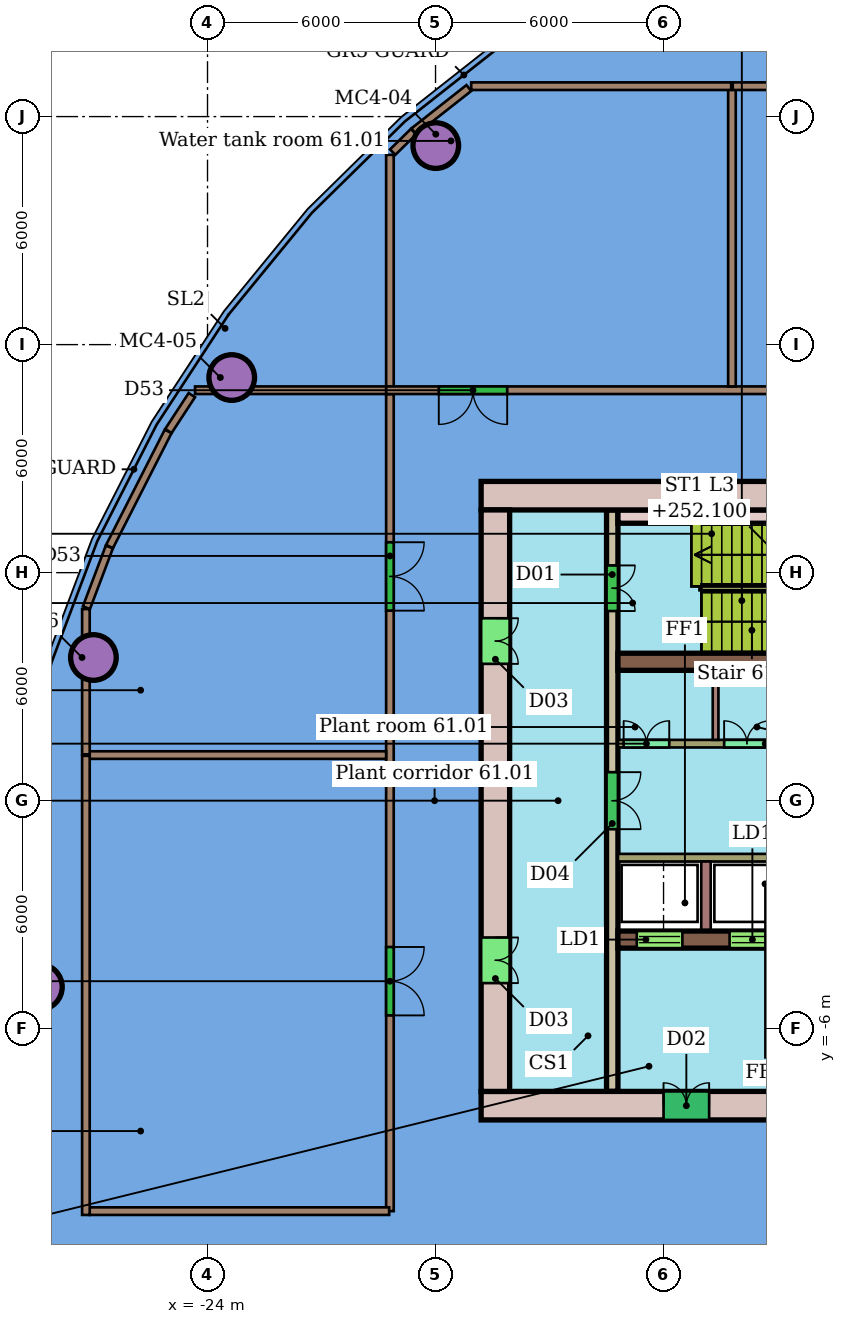
"""IFC4 building model, lengths in metres.
Left out: names, types, materials, properties, quantities, classifications, styles, units other than length and angle.
Written with IfcOpenShell. Run it as: python <this file> out.ifc"""

import sys

from ifc_helpers import new_model, si_unit, direction, frame, frame_2d, origin, origin_2d, place, context, subcontext, project, spatial, rectangle, hollow_circle, extrude, element, fill, save


model = new_model("IFC4")
c1 = context("Model", 3, precision=1e-05, world=origin(), true_north=direction((0.0, 1.0)))
c2 = subcontext(c1, "Body", "Model", "MODEL_VIEW")
j1 = project(units=[si_unit("LENGTHUNIT", "METRE"), si_unit("PLANEANGLEUNIT", "RADIAN")], contexts=[c1])
p1 = place(None, origin())
s1 = spatial("IfcSite", under=j1, at=p1, CompositionType="ELEMENT")
p2 = place(p1, origin())
s2 = spatial("IfcBuilding", under=s1, at=p2, CompositionType="ELEMENT")
p3 = place(p2, frame((0.0, 0.0, 246.1)))
s3 = spatial("IfcBuildingStorey", under=s2, at=p3, CompositionType="ELEMENT", Elevation=246.1)
for number, where, z_axis, x_axis in (
    (1, (-17.993, 17.237, 0.0), (0.0, 0.0, 1.0), (1.0, 0.0, 0.0)),
    (2, (-23.363, 11.134, 0.0), (0.0, 0.0, 1.0), (1.0, 0.0, 0.0)),
    (3, (-27.003, 3.768, 0.0), (0.0, 0.0, 1.0), (1.0, 0.0, 0.0)),
    (4, (-28.424, -4.901, 0.0), (0.0, 0.0, 1.0), (1.0, 0.0, 0.0)),
):
    element("IfcColumn", number, at=place(p3, frame(where, z_axis=z_axis, x_axis=x_axis)), inside=s3, PredefinedType="COLUMN", context=c2, shape_type="SweptSolid", body=[
        extrude(hollow_circle(Radius=0.6, WallThickness=0.045, at=origin_2d()), origin(), (0.0, 0.0, 1.0), 7.85),
    ])
p4 = place(p3, frame((-19.2, 10.7, 0.0), z_axis=(0.0, 0.0, 1.0), x_axis=(0.0, -1.0, 0.0)))
e5 = element("IfcWall", 5, at=p4, inside=s3, PredefinedType="PARTITIONING", context=c2, shape_type="SweptSolid", body=[
    extrude(rectangle(XDim=21.5, YDim=0.2, at=frame_2d((10.75, 0.0))), origin(), (0.0, 0.0, 1.0), 7.5),
])
p5 = place(p4, frame((14.55, 0.0, 0.0)))
e6 = element("IfcOpeningElement", 6, at=p5, cuts=e5, PredefinedType="OPENING", context=c2, shape_type="SweptSolid", body=[
    extrude(rectangle(XDim=1.8, YDim=2.4, at=frame_2d((0.9, 1.2))), frame((0.0, 0.11, 0.0), z_axis=(0.0, -1.0, 0.0), x_axis=(1.0, 0.0, 0.0)), (0.0, 0.0, 1.0), 0.22),
])
p6 = place(p4, frame((3.9, 0.0, 0.0)))
e7 = element("IfcOpeningElement", 7, at=p6, cuts=e5, PredefinedType="OPENING", context=c2, shape_type="SweptSolid", body=[
    extrude(rectangle(XDim=1.8, YDim=2.4, at=frame_2d((0.9, 1.2))), frame((0.0, 0.11, 0.0), z_axis=(0.0, -1.0, 0.0), x_axis=(1.0, 0.0, 0.0)), (0.0, 0.0, 1.0), 0.22),
])
p7 = place(p3, frame((-19.2, 10.82, 0.0), z_axis=(0.0, 0.0, 1.0), x_axis=(0.0, 1.0, 0.0)))
e8 = element("IfcWall", 8, at=p7, inside=s3, PredefinedType="PARTITIONING", context=c2, shape_type="SweptSolid", body=[
    extrude(rectangle(XDim=6.174, YDim=0.2, at=frame_2d((3.087, 0.0))), origin(), (0.0, 0.0, 1.0), 7.5),
])
p8 = place(p3, frame((-24.328, 10.8, 0.0), z_axis=(0.0, 0.0, 1.0), x_axis=(1.0, 0.0, 0.0)))
e9 = element("IfcWall", 9, at=p8, inside=s3, PredefinedType="PARTITIONING", context=c2, shape_type="SweptSolid", body=[
    extrude(rectangle(XDim=5.108, YDim=0.2, at=frame_2d((2.554, 0.0))), origin(), (0.0, 0.0, 1.0), 7.5),
])
p9 = place(p3, frame((7.3, 10.8, 0.0), z_axis=(0.0, 0.0, 1.0), x_axis=(-1.0, 0.0, 0.0)))
e10 = element("IfcWall", 10, at=p9, inside=s3, PredefinedType="PARTITIONING", context=c2, shape_type="SweptSolid", body=[
    extrude(rectangle(XDim=26.6, YDim=0.2, at=frame_2d((13.3, 0.0))), origin(), (0.0, 0.0, 1.0), 7.5),
])
p10 = place(p9, frame((23.414, 0.0, 0.0)))
e11 = element("IfcOpeningElement", 11, at=p10, cuts=e10, PredefinedType="OPENING", context=c2, shape_type="SweptSolid", body=[
    extrude(rectangle(XDim=1.8, YDim=2.4, at=frame_2d((0.9, 1.2))), frame((0.0, 0.11, 0.0), z_axis=(0.0, -1.0, 0.0), x_axis=(1.0, 0.0, 0.0)), (0.0, 0.0, 1.0), 0.22),
])
p11 = place(p9, frame((12.35, 0.0, 0.0)))
e12 = element("IfcOpeningElement", 12, at=p11, cuts=e10, PredefinedType="OPENING", context=c2, shape_type="SweptSolid", body=[
    extrude(rectangle(XDim=1.8, YDim=2.4, at=frame_2d((0.9, 1.2))), frame((0.0, 0.11, 0.0), z_axis=(0.0, -1.0, 0.0), x_axis=(1.0, 0.0, 0.0)), (0.0, 0.0, 1.0), 0.22),
])
p12 = place(p9, frame((3.65, 0.0, 0.0)))
e13 = element("IfcOpeningElement", 13, at=p12, cuts=e10, PredefinedType="OPENING", context=c2, shape_type="SweptSolid", body=[
    extrude(rectangle(XDim=1.8, YDim=2.4, at=frame_2d((0.9, 1.2))), frame((0.0, 0.11, 0.0), z_axis=(0.0, -1.0, 0.0), x_axis=(1.0, 0.0, 0.0)), (0.0, 0.0, 1.0), 0.22),
])
p13 = place(p3, frame((-27.2, 1.2, 0.0), z_axis=(0.0, 0.0, 1.0), x_axis=(1.0, 0.0, 0.0)))
e14 = element("IfcWall", 14, at=p13, inside=s3, PredefinedType="PARTITIONING", context=c2, shape_type="SweptSolid", body=[
    extrude(rectangle(XDim=7.9, YDim=0.2, at=frame_2d((3.95, 0.0))), origin(), (0.0, 0.0, 1.0), 7.5),
])
p14 = place(p3, frame((-10.2, 10.9, 0.0), z_axis=(0.0, 0.0, 1.0), x_axis=(0.0, 1.0, 0.0)))
e15 = element("IfcWall", 15, at=p14, inside=s3, PredefinedType="PARTITIONING", context=c2, shape_type="SweptSolid", body=[
    extrude(rectangle(XDim=7.9, YDim=0.2, at=frame_2d((3.95, 0.0))), origin(), (0.0, 0.0, 1.0), 7.5),
])
p15 = place(p3, frame((-27.1, -10.8, 0.0), z_axis=(0.0, 0.0, 1.0), x_axis=(1.0, 0.0, 0.0)))
e16 = element("IfcWall", 16, at=p15, inside=s3, PredefinedType="PARTITIONING", context=c2, shape_type="SweptSolid", body=[
    extrude(rectangle(XDim=7.88, YDim=0.2, at=frame_2d((3.94, 0.0))), origin(), (0.0, 0.0, 1.0), 7.5),
])
p16 = place(p3, frame((-27.2, -10.9, 0.0), z_axis=(0.0, 0.0, 1.0), x_axis=(0.0, 1.0, 0.0)))
e17 = element("IfcWall", 17, at=p16, inside=s3, PredefinedType="PARTITIONING", context=c2, shape_type="SweptSolid", body=[
    extrude(rectangle(XDim=12.08, YDim=0.2, at=frame_2d((6.04, 0.0))), origin(), (0.0, 0.0, 1.0), 7.5),
])
p17 = place(p3, frame((-27.2, 1.22, 0.0), z_axis=(0.0, 0.0, 1.0), x_axis=(0.0, 1.0, 0.0)))
e18 = element("IfcWall", 18, at=p17, inside=s3, PredefinedType="PARTITIONING", context=c2, shape_type="SweptSolid", body=[
    extrude(rectangle(XDim=3.823, YDim=0.2, at=frame_2d((1.911, 0.0))), origin(), (0.0, 0.0, 1.0), 7.5),
])
p18 = place(p3, frame((-27.187, 5.078, 0.0), z_axis=(0.0, 0.0, 1.0), x_axis=(0.353439463302, 0.935457399233, 0.0)))
e19 = element("IfcWall", 19, at=p18, inside=s3, PredefinedType="PARTITIONING", context=c2, shape_type="SweptSolid", body=[
    extrude(rectangle(XDim=1.709, YDim=0.2, at=frame_2d((0.854, 0.0))), origin(), (0.0, 0.0, 1.0), 7.5),
])
p19 = place(p3, frame((-26.579, 6.687, 0.0), z_axis=(0.0, 0.0, 1.0), x_axis=(0.453691333143, 0.89115889393, 0.0)))
e20 = element("IfcWall", 20, at=p19, inside=s3, PredefinedType="PARTITIONING", context=c2, shape_type="SweptSolid", body=[
    extrude(rectangle(XDim=3.401, YDim=0.2, at=frame_2d((1.7, 0.0))), origin(), (0.0, 0.0, 1.0), 7.5),
])
p20 = place(p3, frame((-25.03, 9.727, 0.0), z_axis=(0.0, 0.0, 1.0), x_axis=(0.546993030609, 0.837137159888, 0.0)))
e21 = element("IfcWall", 21, at=p20, inside=s3, PredefinedType="PARTITIONING", context=c2, shape_type="SweptSolid", body=[
    extrude(rectangle(XDim=1.129, YDim=0.2, at=frame_2d((0.564, 0.0))), origin(), (0.0, 0.0, 1.0), 7.5),
])
p21 = place(p3, frame((-19.127, 17.065, 0.0), z_axis=(0.0, 0.0, 1.0), x_axis=(0.713118996521, 0.701043006384, 0.0)))
e22 = element("IfcWall", 22, at=p21, inside=s3, PredefinedType="PARTITIONING", context=c2, shape_type="SweptSolid", body=[
    extrude(rectangle(XDim=0.768, YDim=0.2, at=frame_2d((0.384, 0.0))), origin(), (0.0, 0.0, 1.0), 7.5),
])
p22 = place(p3, frame((-18.572, 17.611, 0.0), z_axis=(0.0, 0.0, 1.0), x_axis=(0.785678970443, 0.618634427916, 0.0)))
e23 = element("IfcWall", 23, at=p22, inside=s3, PredefinedType="PARTITIONING", context=c2, shape_type="SweptSolid", body=[
    extrude(rectangle(XDim=1.843, YDim=0.2, at=frame_2d((0.921, 0.0))), origin(), (0.0, 0.0, 1.0), 7.5),
])
p23 = place(p3, frame((-17.062, 18.8, 0.0), z_axis=(0.0, 0.0, 1.0), x_axis=(1.0, 0.0, 0.0)))
e24 = element("IfcWall", 24, at=p23, inside=s3, PredefinedType="PARTITIONING", context=c2, shape_type="SweptSolid", body=[
    extrude(rectangle(XDim=6.842, YDim=0.2, at=frame_2d((3.421, 0.0))), origin(), (0.0, 0.0, 1.0), 7.5),
])
p24 = place(p3, frame((-10.18, 18.8, 0.0), z_axis=(0.0, 0.0, 1.0), x_axis=(1.0, 0.0, 0.0)))
e25 = element("IfcWall", 25, at=p24, inside=s3, PredefinedType="PARTITIONING", context=c2, shape_type="SweptSolid", body=[
    extrude(rectangle(XDim=8.46, YDim=0.2, at=frame_2d((4.23, 0.0))), origin(), (0.0, 0.0, 1.0), 7.5),
])
p25 = place(p3, frame((-6.0, 8.025, 0.0), z_axis=(0.0, 0.0, 1.0), x_axis=(-1.0, 0.0, 0.0)))
e26 = element("IfcWall", 26, at=p25, inside=s3, PredefinedType="SHEAR", context=c2, shape_type="SweptSolid", body=[
    extrude(rectangle(XDim=10.8, YDim=0.75, at=frame_2d((5.4, 0.0))), origin(), (0.0, 0.0, 1.0), 7.55),
])
p26 = place(p3, frame((-16.8, -8.025, 0.0), z_axis=(0.0, 0.0, 1.0), x_axis=(1.0, 0.0, 0.0)))
e27 = element("IfcWall", 27, at=p26, inside=s3, PredefinedType="SHEAR", context=c2, shape_type="SweptSolid", body=[
    extrude(rectangle(XDim=21.6, YDim=0.75, at=frame_2d((10.8, 0.0))), origin(), (0.0, 0.0, 1.0), 7.55),
])
p27 = place(p26, frame((4.8, 0.0, 0.0)))
e28 = element("IfcOpeningElement", 28, at=p27, cuts=e27, PredefinedType="OPENING", context=c2, shape_type="SweptSolid", body=[
    extrude(rectangle(XDim=1.2, YDim=2.1, at=frame_2d((0.6, 1.05))), frame((0.0, 0.385, 0.0), z_axis=(0.0, -1.0, 0.0), x_axis=(1.0, 0.0, 0.0)), (0.0, 0.0, 1.0), 0.77),
])
p28 = place(p3, frame((-16.425, 7.65, 0.0), z_axis=(0.0, 0.0, 1.0), x_axis=(0.0, -1.0, 0.0)))
e29 = element("IfcWall", 29, at=p28, inside=s3, PredefinedType="SHEAR", context=c2, shape_type="SweptSolid", body=[
    extrude(rectangle(XDim=15.3, YDim=0.75, at=frame_2d((7.65, 0.0))), origin(), (0.0, 0.0, 1.0), 7.55),
])
p29 = place(p28, frame((11.25, 0.0, 0.0)))
e30 = element("IfcOpeningElement", 30, at=p29, cuts=e29, PredefinedType="OPENING", context=c2, shape_type="SweptSolid", body=[
    extrude(rectangle(XDim=1.2, YDim=2.1, at=frame_2d((0.6, 1.05))), frame((0.0, 0.385, 0.0), z_axis=(0.0, -1.0, 0.0), x_axis=(1.0, 0.0, 0.0)), (0.0, 0.0, 1.0), 0.77),
])
p30 = place(p28, frame((2.85, 0.0, 0.0)))
e31 = element("IfcOpeningElement", 31, at=p30, cuts=e29, PredefinedType="OPENING", context=c2, shape_type="SweptSolid", body=[
    extrude(rectangle(XDim=1.2, YDim=2.1, at=frame_2d((0.6, 1.05))), frame((0.0, 0.385, 0.0), z_axis=(0.0, -1.0, 0.0), x_axis=(1.0, 0.0, 0.0)), (0.0, 0.0, 1.0), 0.77),
])
p31 = place(p3, frame((-13.2, 3.655, 0.0), z_axis=(0.0, 0.0, 1.0), x_axis=(1.0, 0.0, 0.0)))
e32 = element("IfcWall", 32, at=p31, inside=s3, PredefinedType="SHEAR", context=c2, shape_type="SweptSolid", body=[
    extrude(rectangle(XDim=7.2, YDim=0.45, at=frame_2d((3.6, 0.0))), origin(), (0.0, 0.0, 1.0), 7.55),
])
p32 = place(p3, frame((-13.2, -3.655, 0.0), z_axis=(0.0, 0.0, 1.0), x_axis=(1.0, 0.0, 0.0)))
e33 = element("IfcWall", 33, at=p32, inside=s3, PredefinedType="SHEAR", context=c2, shape_type="SweptSolid", body=[
    extrude(rectangle(XDim=7.2, YDim=0.45, at=frame_2d((3.6, 0.0))), origin(), (0.0, 0.0, 1.0), 7.55),
])
p33 = place(p32, frame((0.496, 0.0, 0.0)))
e34 = element("IfcOpeningElement", 34, at=p33, cuts=e33, PredefinedType="OPENING", context=c2, shape_type="SweptSolid", body=[
    extrude(rectangle(XDim=1.2, YDim=2.1, at=frame_2d((0.6, 1.05))), frame((0.0, 0.235, 0.0), z_axis=(0.0, -1.0, 0.0), x_axis=(1.0, 0.0, 0.0)), (0.0, 0.0, 1.0), 0.47),
])
p34 = place(p32, frame((2.938, 0.0, 0.0)))
e35 = element("IfcOpeningElement", 35, at=p34, cuts=e33, PredefinedType="OPENING", context=c2, shape_type="SweptSolid", body=[
    extrude(rectangle(XDim=1.2, YDim=2.1, at=frame_2d((0.6, 1.05))), frame((0.0, 0.235, 0.0), z_axis=(0.0, -1.0, 0.0), x_axis=(1.0, 0.0, 0.0)), (0.0, 0.0, 1.0), 0.47),
])
p35 = place(p3, frame((-13.35, 7.65, 0.0), z_axis=(0.0, 0.0, 1.0), x_axis=(0.0, -1.0, 0.0)))
e36 = element("IfcWall", 36, at=p35, inside=s3, PredefinedType="SHEAR", context=c2, shape_type="SweptSolid", body=[
    extrude(rectangle(XDim=15.3, YDim=0.3, at=frame_2d((7.65, 0.0))), origin(), (0.0, 0.0, 1.0), 7.55),
])
p36 = place(p35, frame((1.46, 0.0, 0.0)))
e37 = element("IfcOpeningElement", 37, at=p36, cuts=e36, PredefinedType="OPENING", context=c2, shape_type="SweptSolid", body=[
    extrude(rectangle(XDim=1.2, YDim=2.1, at=frame_2d((0.6, 1.05))), frame((0.0, 0.16, 0.0), z_axis=(0.0, -1.0, 0.0), x_axis=(1.0, 0.0, 0.0)), (0.0, 0.0, 1.0), 0.32),
])
p37 = place(p35, frame((6.9, 0.0, 0.0)))
e38 = element("IfcOpeningElement", 38, at=p37, cuts=e36, PredefinedType="OPENING", context=c2, shape_type="SweptSolid", body=[
    extrude(rectangle(XDim=1.5, YDim=2.1, at=frame_2d((0.75, 1.05))), frame((0.0, 0.16, 0.0), z_axis=(0.0, -1.0, 0.0), x_axis=(1.0, 0.0, 0.0)), (0.0, 0.0, 1.0), 0.32),
])
p38 = place(p3, frame((-13.2, 1.5, 0.0), z_axis=(0.0, 0.0, 1.0), x_axis=(1.0, 0.0, 0.0)))
e39 = element("IfcWall", 39, at=p38, inside=s3, PredefinedType="SHEAR", context=c2, shape_type="SweptSolid", body=[
    extrude(rectangle(XDim=14.4, YDim=0.2, at=frame_2d((7.2, 0.0))), origin(), (0.0, 0.0, 1.0), 7.55),
])
p39 = place(p38, frame((0.15, 0.0, 0.0)))
e40 = element("IfcOpeningElement", 40, at=p39, cuts=e39, PredefinedType="OPENING", context=c2, shape_type="SweptSolid", body=[
    extrude(rectangle(XDim=1.2, YDim=2.4, at=frame_2d((0.6, 1.2))), frame((0.0, 0.11, 0.0), z_axis=(0.0, -1.0, 0.0), x_axis=(1.0, 0.0, 0.0)), (0.0, 0.0, 1.0), 0.22),
])
p40 = place(p38, frame((2.794, 0.0, 0.0)))
e41 = element("IfcOpeningElement", 41, at=p40, cuts=e39, PredefinedType="OPENING", context=c2, shape_type="SweptSolid", body=[
    extrude(rectangle(XDim=1.2, YDim=2.4, at=frame_2d((0.6, 1.2))), frame((0.0, 0.11, 0.0), z_axis=(0.0, -1.0, 0.0), x_axis=(1.0, 0.0, 0.0)), (0.0, 0.0, 1.0), 0.22),
])
p41 = place(p38, frame((8.167, 0.0, 0.0)))
e42 = element("IfcOpeningElement", 42, at=p41, cuts=e39, PredefinedType="OPENING", context=c2, shape_type="SweptSolid", body=[
    extrude(rectangle(XDim=1.2, YDim=2.4, at=frame_2d((0.6, 1.2))), frame((0.0, 0.11, 0.0), z_axis=(0.0, -1.0, 0.0), x_axis=(1.0, 0.0, 0.0)), (0.0, 0.0, 1.0), 0.22),
])
p42 = place(p3, frame((1.2, -1.5, 0.0), z_axis=(0.0, 0.0, 1.0), x_axis=(-1.0, 0.0, 0.0)))
e43 = element("IfcWall", 43, at=p42, inside=s3, PredefinedType="SHEAR", context=c2, shape_type="SweptSolid", body=[
    extrude(rectangle(XDim=14.4, YDim=0.2, at=frame_2d((7.2, 0.0))), origin(), (0.0, 0.0, 1.0), 7.55),
])
p43 = place(p42, frame((7.821, 0.0, 0.0)))
e44 = element("IfcOpeningElement", 44, at=p43, cuts=e43, PredefinedType="OPENING", context=c2, shape_type="SweptSolid", body=[
    extrude(rectangle(XDim=1.2, YDim=2.1, at=frame_2d((0.6, 1.05))), frame((0.0, 0.11, 0.0), z_axis=(0.0, -1.0, 0.0), x_axis=(1.0, 0.0, 0.0)), (0.0, 0.0, 1.0), 0.22),
])
p44 = place(p42, frame((2.592, 0.0, 0.0)))
e45 = element("IfcOpeningElement", 45, at=p44, cuts=e43, PredefinedType="OPENING", context=c2, shape_type="SweptSolid", body=[
    extrude(rectangle(XDim=1.2, YDim=2.4, at=frame_2d((0.6, 1.2))), frame((0.0, 0.11, 0.0), z_axis=(0.0, -1.0, 0.0), x_axis=(1.0, 0.0, 0.0)), (0.0, 0.0, 1.0), 0.22),
])
p45 = place(p3, frame((-13.2, 7.475, 0.0), z_axis=(0.0, 0.0, 1.0), x_axis=(1.0, 0.0, 0.0)))
e46 = element("IfcWall", 46, at=p45, inside=s3, PredefinedType="SHEAR", context=c2, shape_type="SweptSolid", body=[
    extrude(rectangle(XDim=7.05, YDim=0.35, at=frame_2d((3.525, 0.0))), origin(), (0.0, 0.0, 1.0), 7.55),
])
p46 = place(p3, frame((-10.631, 1.6, 0.0), z_axis=(0.0, 0.0, 1.0), x_axis=(0.0, 1.0, 0.0)))
e47 = element("IfcWall", 47, at=p46, inside=s3, PredefinedType="PARTITIONING", context=c2, shape_type="SweptSolid", body=[
    extrude(rectangle(XDim=1.83, YDim=0.15, at=frame_2d((0.915, 0.0))), origin(), (0.0, 0.0, 1.0), 7.55),
])
p47 = place(p3, frame((-10.883, -1.6, 0.0), z_axis=(0.0, 0.0, 1.0), x_axis=(0.0, -1.0, 0.0)))
e48 = element("IfcWall", 48, at=p47, inside=s3, PredefinedType="SHEAR", context=c2, shape_type="SweptSolid", body=[
    extrude(rectangle(XDim=1.83, YDim=0.25, at=frame_2d((0.915, 0.0))), origin(), (0.0, 0.0, 1.0), 7.55),
])
p48 = place(p5, origin())
e49 = element("IfcDoor", 49, at=p48, inside=s3, OperationType="DOUBLE_DOOR_SINGLE_SWING", PredefinedType="DOOR", context=c2, shape_type="SweptSolid", body=[
    extrude(rectangle(XDim=1.8, YDim=2.4, at=frame_2d((0.9, 1.2))), frame((0.0, 0.025, 0.0), z_axis=(0.0, -1.0, 0.0), x_axis=(1.0, 0.0, 0.0)), (0.0, 0.0, 1.0), 0.05),
])
fill(e6, e49)
p49 = place(p6, origin())
e50 = element("IfcDoor", 50, at=p49, inside=s3, OperationType="DOUBLE_DOOR_SINGLE_SWING", PredefinedType="DOOR", context=c2, shape_type="SweptSolid", body=[
    extrude(rectangle(XDim=1.8, YDim=2.4, at=frame_2d((0.9, 1.2))), frame((0.0, 0.025, 0.0), z_axis=(0.0, -1.0, 0.0), x_axis=(1.0, 0.0, 0.0)), (0.0, 0.0, 1.0), 0.05),
])
fill(e7, e50)
p50 = place(p10, origin())
e51 = element("IfcDoor", 51, at=p50, inside=s3, OperationType="DOUBLE_DOOR_SINGLE_SWING", PredefinedType="DOOR", context=c2, shape_type="SweptSolid", body=[
    extrude(rectangle(XDim=1.8, YDim=2.4, at=frame_2d((0.9, 1.2))), frame((0.0, 0.025, 0.0), z_axis=(0.0, -1.0, 0.0), x_axis=(1.0, 0.0, 0.0)), (0.0, 0.0, 1.0), 0.05),
])
fill(e11, e51)
p51 = place(p27, origin())
e52 = element("IfcDoor", 52, at=p51, inside=s3, OperationType="DOUBLE_DOOR_SINGLE_SWING", PredefinedType="NOTDEFINED", context=c2, shape_type="SweptSolid", body=[
    extrude(rectangle(XDim=1.2, YDim=2.1, at=frame_2d((0.6, 1.05))), frame((0.0, 0.025, 0.0), z_axis=(0.0, -1.0, 0.0), x_axis=(1.0, 0.0, 0.0)), (0.0, 0.0, 1.0), 0.05),
])
fill(e28, e52)
p52 = place(p29, origin())
e53 = element("IfcDoor", 53, at=p52, inside=s3, OperationType="DOUBLE_DOOR_SINGLE_SWING", PredefinedType="NOTDEFINED", context=c2, shape_type="SweptSolid", body=[
    extrude(rectangle(XDim=1.2, YDim=2.1, at=frame_2d((0.6, 1.05))), frame((0.0, 0.025, 0.0), z_axis=(0.0, -1.0, 0.0), x_axis=(1.0, 0.0, 0.0)), (0.0, 0.0, 1.0), 0.05),
])
fill(e30, e53)
p53 = place(p30, origin())
e54 = element("IfcDoor", 54, at=p53, inside=s3, OperationType="DOUBLE_DOOR_SINGLE_SWING", PredefinedType="NOTDEFINED", context=c2, shape_type="SweptSolid", body=[
    extrude(rectangle(XDim=1.2, YDim=2.1, at=frame_2d((0.6, 1.05))), frame((0.0, 0.025, 0.0), z_axis=(0.0, -1.0, 0.0), x_axis=(1.0, 0.0, 0.0)), (0.0, 0.0, 1.0), 0.05),
])
fill(e31, e54)
p54 = place(p33, origin())
e55 = element("IfcDoor", 55, at=p54, inside=s3, OperationType="DOUBLE_DOOR_SLIDING", PredefinedType="NOTDEFINED", context=c2, shape_type="SweptSolid", body=[
    extrude(rectangle(XDim=1.2, YDim=2.1, at=frame_2d((0.6, 1.05))), frame((0.0, 0.025, 0.0), z_axis=(0.0, -1.0, 0.0), x_axis=(1.0, 0.0, 0.0)), (0.0, 0.0, 1.0), 0.05),
])
fill(e34, e55)
p55 = place(p34, origin())
e56 = element("IfcDoor", 56, at=p55, inside=s3, OperationType="DOUBLE_DOOR_SLIDING", PredefinedType="NOTDEFINED", context=c2, shape_type="SweptSolid", body=[
    extrude(rectangle(XDim=1.2, YDim=2.1, at=frame_2d((0.6, 1.05))), frame((0.0, 0.025, 0.0), z_axis=(0.0, -1.0, 0.0), x_axis=(1.0, 0.0, 0.0)), (0.0, 0.0, 1.0), 0.05),
])
fill(e35, e56)
p56 = place(p36, origin())
e57 = element("IfcDoor", 57, at=p56, inside=s3, OperationType="DOUBLE_DOOR_SINGLE_SWING", PredefinedType="NOTDEFINED", context=c2, shape_type="SweptSolid", body=[
    extrude(rectangle(XDim=1.2, YDim=2.1, at=frame_2d((0.6, 1.05))), frame((0.0, 0.025, 0.0), z_axis=(0.0, -1.0, 0.0), x_axis=(1.0, 0.0, 0.0)), (0.0, 0.0, 1.0), 0.05),
])
fill(e37, e57)
p57 = place(p37, origin())
e58 = element("IfcDoor", 58, at=p57, inside=s3, OperationType="DOUBLE_DOOR_SINGLE_SWING", PredefinedType="NOTDEFINED", context=c2, shape_type="SweptSolid", body=[
    extrude(rectangle(XDim=1.5, YDim=2.1, at=frame_2d((0.75, 1.05))), frame((0.0, 0.025, 0.0), z_axis=(0.0, -1.0, 0.0), x_axis=(1.0, 0.0, 0.0)), (0.0, 0.0, 1.0), 0.05),
])
fill(e38, e58)
p58 = place(p39, origin())
e59 = element("IfcDoor", 59, at=p58, inside=s3, OperationType="DOUBLE_DOOR_SINGLE_SWING", PredefinedType="NOTDEFINED", context=c2, shape_type="SweptSolid", body=[
    extrude(rectangle(XDim=1.2, YDim=2.4, at=frame_2d((0.6, 1.2))), frame((0.0, 0.025, 0.0), z_axis=(0.0, -1.0, 0.0), x_axis=(1.0, 0.0, 0.0)), (0.0, 0.0, 1.0), 0.05),
])
fill(e40, e59)
p59 = place(p40, origin())
e60 = element("IfcDoor", 60, at=p59, inside=s3, OperationType="DOUBLE_DOOR_SINGLE_SWING", PredefinedType="NOTDEFINED", context=c2, shape_type="SweptSolid", body=[
    extrude(rectangle(XDim=1.2, YDim=2.4, at=frame_2d((0.6, 1.2))), frame((0.0, 0.025, 0.0), z_axis=(0.0, -1.0, 0.0), x_axis=(1.0, 0.0, 0.0)), (0.0, 0.0, 1.0), 0.05),
])
fill(e41, e60)
save(model, sys.argv[1])
